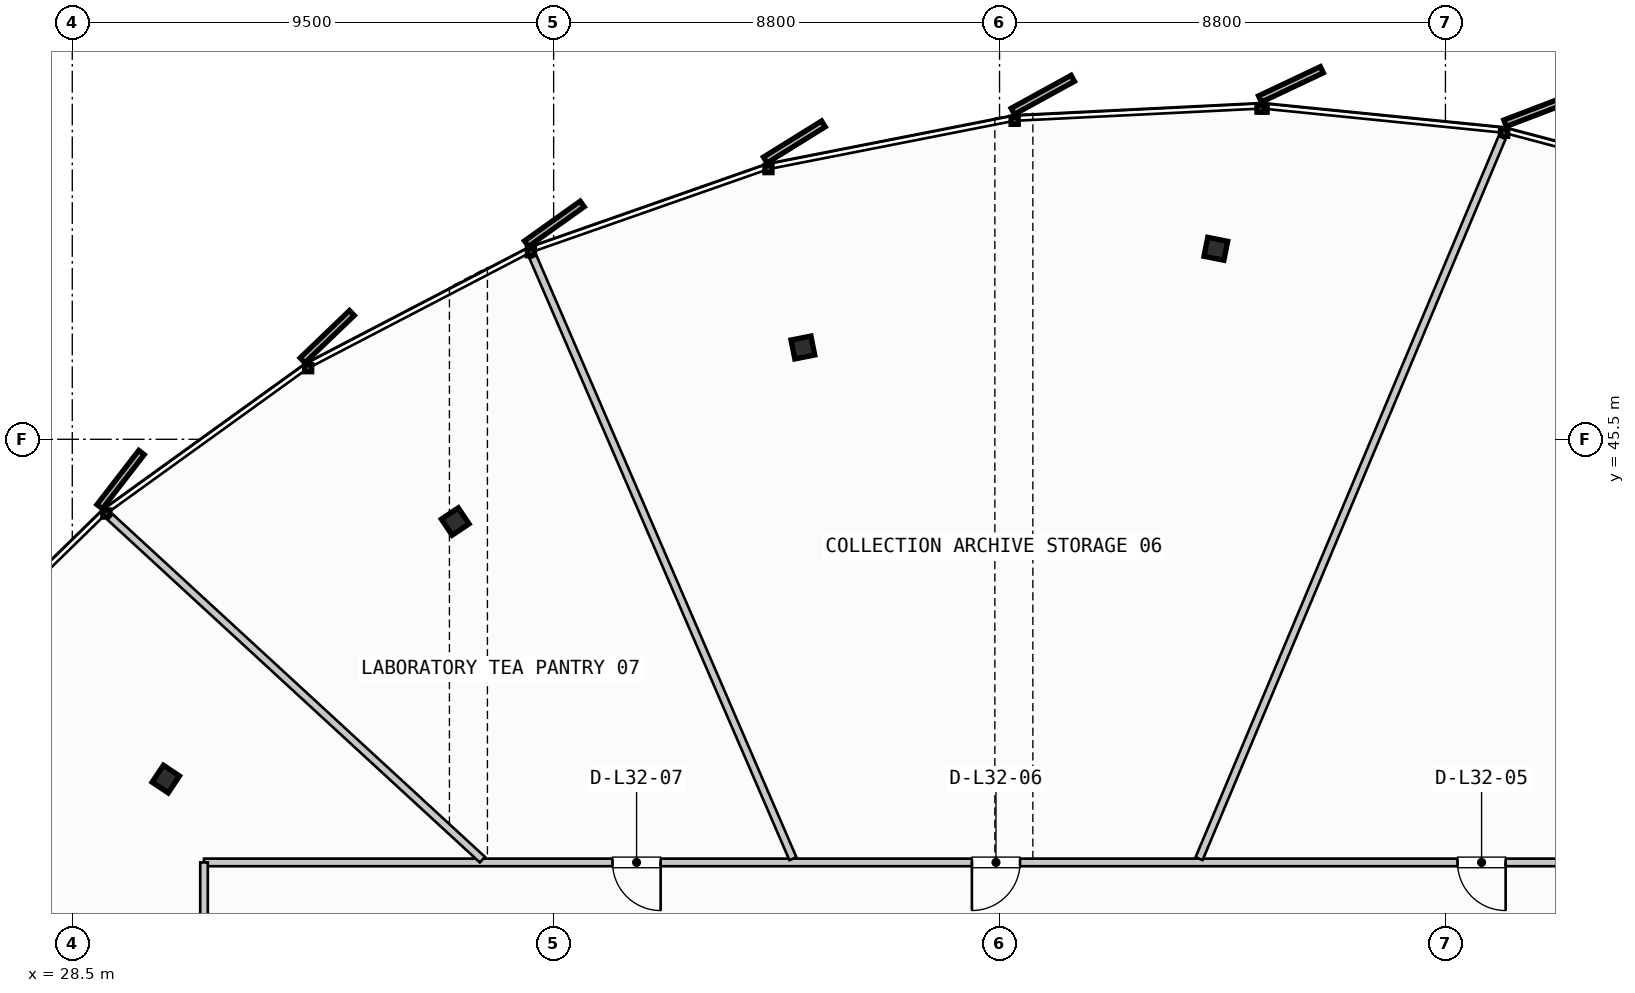
"""IFC4 building model, lengths in metres.
Left out: names, types, materials, properties, quantities, classifications, styles, units other than length and angle.
Written with IfcOpenShell. Run it as: python <this file> out.ifc"""

import sys

from ifc_helpers import new_model, si_unit, direction, frame, frame_2d, origin, origin_2d, place, context, subcontext, project, spatial, rectangle, i_section, extrude, source, transform, mapped, element, fill, save


model = new_model("IFC4")
c1 = context("Model", 3, precision=1e-05, world=origin(), true_north=direction((0.0, 1.0)))
c2 = subcontext(c1, "Body", "Model", "MODEL_VIEW")
j1 = project(units=[si_unit("LENGTHUNIT", "METRE"), si_unit("PLANEANGLEUNIT", "RADIAN")], contexts=[c1])
p1 = place(None, origin())
s1 = spatial("IfcSite", under=j1, at=p1, CompositionType="ELEMENT")
p2 = place(p1, origin())
s2 = spatial("IfcBuilding", under=s1, at=p2, CompositionType="ELEMENT")
p3 = place(p2, frame((0.0, 0.0, 128.8)))
s3 = spatial("IfcBuildingStorey", under=s2, at=p3, CompositionType="ELEMENT", Elevation=128.8)
m1 = source(origin(), c2, "Body", "SweptSolid", [
    extrude(i_section(OverallWidth=0.401, OverallDepth=0.381, WebThickness=0.032, FlangeThickness=0.051, FilletRadius=0.015, at=origin_2d()), origin(), (0.0, 0.0, 1.0), 3.3),
])
for number, where, z_axis, x_axis in (
    (1, (51.069, 49.259, 0.0), (0.0, 0.0, 1.0), (0.195, 0.981, 0.0)),
    (2, (42.919, 47.311, 0.0), (0.0, 0.0, 1.0), (-0.195, 0.981, 0.0)),
    (3, (36.058, 43.877, 0.0), (0.0, 0.0, 1.0), (-0.556, 0.831, 0.0)),
    (4, (30.346, 38.794, 0.0), (0.0, 0.0, 1.0), (-0.831, 0.556, 0.0)),
):
    element("IfcColumn", number, at=place(p3, frame(where, z_axis=z_axis, x_axis=x_axis)), inside=s3, PredefinedType="COLUMN", context=c2, shape_type="MappedRepresentation", body=[
        mapped(m1, transform((0.0, 0.0, 0.0), scale=1.0)),
    ])
p4 = place(p3, frame((62.5, 37.15, 0.0), z_axis=(0.0, 0.0, 1.0), x_axis=(-1.0, 0.0, 0.0)))
e5 = element("IfcWall", 5, at=p4, inside=s3, PredefinedType="PARTITIONING", context=c2, shape_type="SweptSolid", body=[
    extrude(rectangle(XDim=31.4, YDim=0.15, at=frame_2d((15.7, 0.0))), origin(), (0.0, 0.0, 1.0), 2.445),
])
p5 = place(p4, frame((5.711, 0.0, 0.0)))
e6 = element("IfcOpeningElement", 6, at=p5, cuts=e5, PredefinedType="OPENING", context=c2, shape_type="SweptSolid", body=[
    extrude(rectangle(XDim=0.95, YDim=2.15, at=frame_2d((0.475, 1.075))), frame((0.0, 0.085, 0.0), z_axis=(0.0, -1.0, 0.0), x_axis=(1.0, 0.0, 0.0)), (0.0, 0.0, 1.0), 0.17),
])
p6 = place(p4, frame((15.295, 0.0, 0.0)))
e7 = element("IfcOpeningElement", 7, at=p6, cuts=e5, PredefinedType="OPENING", context=c2, shape_type="SweptSolid", body=[
    extrude(rectangle(XDim=0.95, YDim=2.15, at=frame_2d((0.475, 1.075))), frame((0.0, 0.085, 0.0), z_axis=(0.0, -1.0, 0.0), x_axis=(1.0, 0.0, 0.0)), (0.0, 0.0, 1.0), 0.17),
])
p7 = place(p4, frame((22.388, 0.0, 0.0)))
e8 = element("IfcOpeningElement", 8, at=p7, cuts=e5, PredefinedType="OPENING", context=c2, shape_type="SweptSolid", body=[
    extrude(rectangle(XDim=0.95, YDim=2.15, at=frame_2d((0.475, 1.075))), frame((0.0, 0.085, 0.0), z_axis=(0.0, -1.0, 0.0), x_axis=(1.0, 0.0, 0.0)), (0.0, 0.0, 1.0), 0.17),
])
p8 = place(p3, frame((31.1, 37.15, 0.0), z_axis=(0.0, 0.0, 1.0), x_axis=(0.0, -1.0, 0.0)))
e9 = element("IfcWall", 9, at=p8, inside=s3, PredefinedType="PARTITIONING", context=c2, shape_type="SweptSolid", body=[
    extrude(rectangle(XDim=1.7, YDim=0.15, at=frame_2d((0.85, 0.0))), origin(), (0.0, 0.0, 1.0), 2.445),
])
p9 = place(p3, frame((50.738, 37.224, 0.0), z_axis=(0.0, 0.0, 1.0), x_axis=(0.387456696023, 0.921887904632, 0.0)))
e10 = element("IfcWall", 10, at=p9, inside=s3, PredefinedType="PARTITIONING", context=c2, shape_type="SweptSolid", body=[
    extrude(rectangle(XDim=15.438, YDim=0.15, at=frame_2d((7.719, 0.0))), origin(), (0.0, 0.0, 1.0), 2.445),
])
p10 = place(p3, frame((42.722, 37.223, 0.0), z_axis=(0.0, 0.0, 1.0), x_axis=(-0.396596155685, 0.917993185866, 0.0)))
e11 = element("IfcWall", 11, at=p10, inside=s3, PredefinedType="PARTITIONING", context=c2, shape_type="SweptSolid", body=[
    extrude(rectangle(XDim=12.937, YDim=0.15, at=frame_2d((6.468, 0.0))), origin(), (0.0, 0.0, 1.0), 2.445),
])
p11 = place(p3, frame((36.594, 37.204, 0.0), z_axis=(0.0, 0.0, 1.0), x_axis=(-0.735789683626, 0.67721011619, 0.0)))
e12 = element("IfcWall", 12, at=p11, inside=s3, PredefinedType="PARTITIONING", context=c2, shape_type="SweptSolid", body=[
    extrude(rectangle(XDim=9.986, YDim=0.15, at=frame_2d((4.993, 0.0))), origin(), (0.0, 0.0, 1.0), 2.445),
])
m2 = source(origin(), c2, "Body", "SweptSolid", [
    extrude(rectangle(XDim=0.95, YDim=2.15, at=frame_2d((0.475, 1.075))), frame((0.0, 0.025, 0.0), z_axis=(0.0, -1.0, 0.0), x_axis=(1.0, 0.0, 0.0)), (0.0, 0.0, 1.0), 0.05),
])
p12 = place(p5, origin())
e13 = element("IfcDoor", 13, at=p12, inside=s3, OperationType="SINGLE_SWING_LEFT", PredefinedType="DOOR", context=c2, shape_type="MappedRepresentation", body=[
    mapped(m2, transform((0.0, 0.0, 0.0), scale=1.0)),
])
fill(e6, e13)
p13 = place(p6, origin())
e14 = element("IfcDoor", 14, at=p13, inside=s3, OperationType="SINGLE_SWING_RIGHT", PredefinedType="DOOR", context=c2, shape_type="MappedRepresentation", body=[
    mapped(m2, transform((0.0, 0.0, 0.0), scale=1.0)),
])
fill(e7, e14)
p14 = place(p7, origin())
e15 = element("IfcDoor", 15, at=p14, inside=s3, OperationType="SINGLE_SWING_LEFT", PredefinedType="DOOR", context=c2, shape_type="MappedRepresentation", body=[
    mapped(m2, transform((0.0, 0.0, 0.0), scale=1.0)),
])
fill(e8, e15)
save(model, sys.argv[1])
